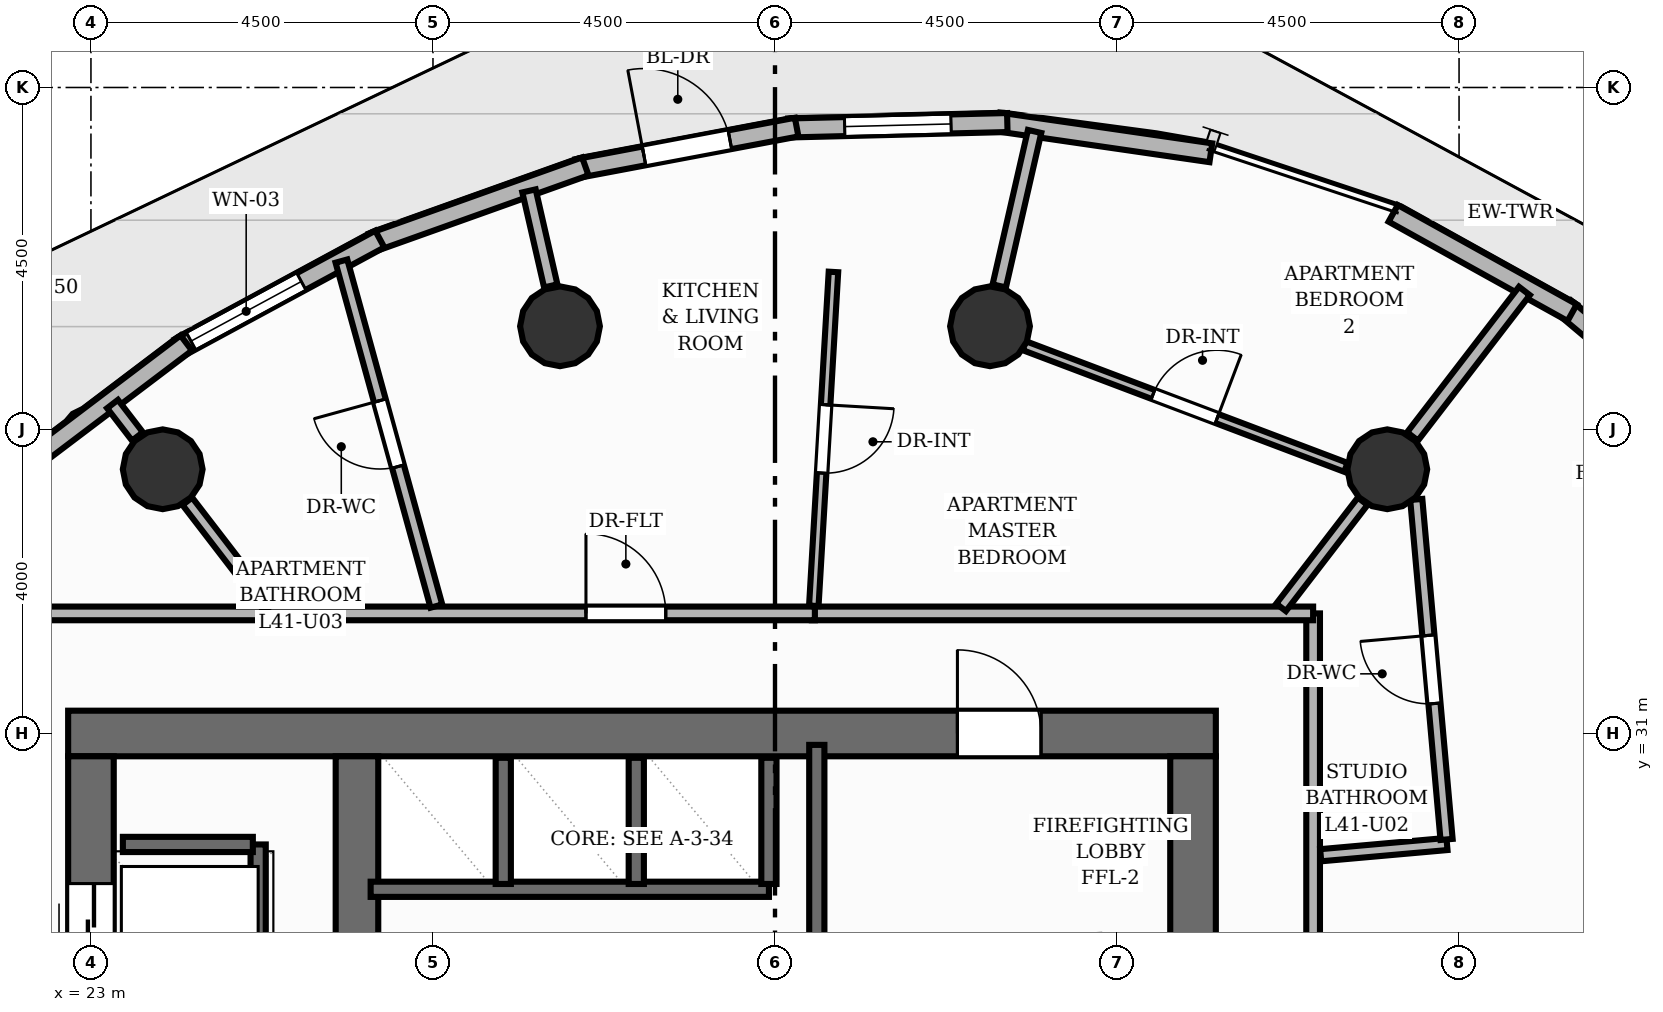
"""IFC4 building model, lengths in metres.
Left out: names, types, materials, properties, quantities, classifications, styles, units other than length and angle.
Written with IfcOpenShell. Run it as: python <this file> out.ifc"""

import sys

from ifc_helpers import new_model, si_unit, direction, frame, frame_2d, origin, origin_2d, place, context, subcontext, project, spatial, rectangle, circle, extrude, element, fill, save


model = new_model("IFC4")
c1 = context("Model", 3, precision=1e-05, world=origin(), true_north=direction((0.0, 1.0)))
c2 = subcontext(c1, "Body", "Model", "MODEL_VIEW")
j1 = project(units=[si_unit("LENGTHUNIT", "METRE"), si_unit("PLANEANGLEUNIT", "RADIAN")], contexts=[c1])
p1 = place(None, origin())
s1 = spatial("IfcSite", under=j1, at=p1, CompositionType="ELEMENT")
p2 = place(p1, origin())
s2 = spatial("IfcBuilding", under=s1, at=p2, CompositionType="ELEMENT")
p3 = place(p2, frame((0.0, 0.0, 139.36)))
s3 = spatial("IfcBuildingStorey", under=s2, at=p3, CompositionType="ELEMENT", Elevation=139.36)
p4 = place(p3, frame((22.7, 31.0, 0.0), z_axis=(0.0, 0.0, 1.0), x_axis=(1.0, 0.0, 0.0)))
e1 = element("IfcWall", 1, at=p4, inside=s3, PredefinedType="SHEAR", context=c2, shape_type="SweptSolid", body=[
    extrude(rectangle(XDim=15.1, YDim=0.6, at=frame_2d((7.55, 0.0))), origin(), (0.0, 0.0, 1.0), 3.2),
])
p5 = place(p4, frame((11.7, 0.0, 0.0)))
e2 = element("IfcOpeningElement", 2, at=p5, cuts=e1, PredefinedType="OPENING", context=c2, shape_type="SweptSolid", body=[
    extrude(rectangle(XDim=1.1, YDim=2.15, at=frame_2d((0.55, 1.075))), frame((0.0, 0.31, 0.0), z_axis=(0.0, -1.0, 0.0), x_axis=(1.0, 0.0, 0.0)), (0.0, 0.0, 1.0), 0.62),
])
p6 = place(p3, frame((23.0, 17.3, 0.0), z_axis=(0.0, 0.0, 1.0), x_axis=(0.0, 1.0, 0.0)))
e3 = element("IfcWall", 3, at=p6, inside=s3, PredefinedType="SHEAR", context=c2, shape_type="SweptSolid", body=[
    extrude(rectangle(XDim=13.4, YDim=0.6, at=frame_2d((6.7, 0.0))), origin(), (0.0, 0.0, 1.0), 3.2),
])
p7 = place(p6, frame((1.675, 0.0, 0.0)))
e4 = element("IfcOpeningElement", 4, at=p7, cuts=e3, PredefinedType="OPENING", context=c2, shape_type="SweptSolid", body=[
    extrude(rectangle(XDim=1.05, YDim=2.15, at=frame_2d((0.525, 1.075))), frame((0.0, 0.31, 0.0), z_axis=(0.0, -1.0, 0.0), x_axis=(1.0, 0.0, 0.0)), (0.0, 0.0, 1.0), 0.62),
])
p8 = place(p6, frame((6.175, 0.0, 0.0)))
e5 = element("IfcOpeningElement", 5, at=p8, cuts=e3, PredefinedType="OPENING", context=c2, shape_type="SweptSolid", body=[
    extrude(rectangle(XDim=1.05, YDim=2.15, at=frame_2d((0.525, 1.075))), frame((0.0, 0.31, 0.0), z_axis=(0.0, -1.0, 0.0), x_axis=(1.0, 0.0, 0.0)), (0.0, 0.0, 1.0), 0.62),
])
p9 = place(p6, frame((10.675, 0.0, 0.0)))
e6 = element("IfcOpeningElement", 6, at=p9, cuts=e3, PredefinedType="OPENING", context=c2, shape_type="SweptSolid", body=[
    extrude(rectangle(XDim=1.05, YDim=2.15, at=frame_2d((0.525, 1.075))), frame((0.0, 0.31, 0.0), z_axis=(0.0, -1.0, 0.0), x_axis=(1.0, 0.0, 0.0)), (0.0, 0.0, 1.0), 0.62),
])
p10 = place(p3, frame((37.5, 17.3, 0.0), z_axis=(0.0, 0.0, 1.0), x_axis=(0.0, 1.0, 0.0)))
e7 = element("IfcWall", 7, at=p10, inside=s3, PredefinedType="SHEAR", context=c2, shape_type="SweptSolid", body=[
    extrude(rectangle(XDim=13.4, YDim=0.6, at=frame_2d((6.7, 0.0))), origin(), (0.0, 0.0, 1.0), 3.2),
])
p11 = place(p3, frame((26.5, 17.3, 0.0), z_axis=(0.0, 0.0, 1.0), x_axis=(0.0, 1.0, 0.0)))
e8 = element("IfcWall", 8, at=p11, inside=s3, PredefinedType="SHEAR", context=c2, shape_type="SweptSolid", body=[
    extrude(rectangle(XDim=13.4, YDim=0.56, at=frame_2d((6.7, 0.0))), origin(), (0.0, 0.0, 1.0), 3.2),
])
for number, where, z_axis, x_axis in (
    (9, (40.056, 34.477, 0.0), (0.0, 0.0, 1.0), (1.0, 0.0, 0.0)),
    (10, (34.829, 36.358, 0.0), (0.0, 0.0, 1.0), (1.0, 0.0, 0.0)),
    (11, (29.171, 36.358, 0.0), (0.0, 0.0, 1.0), (1.0, 0.0, 0.0)),
    (12, (23.944, 34.477, 0.0), (0.0, 0.0, 1.0), (1.0, 0.0, 0.0)),
):
    element("IfcColumn", number, at=place(p3, frame(where, z_axis=z_axis, x_axis=x_axis)), inside=s3, PredefinedType="COLUMN", context=c2, shape_type="SweptSolid", body=[
        extrude(circle(Radius=0.525, at=origin_2d()), origin(), (0.0, 0.0, 1.0), 3.2),
    ])
p12 = place(p3, frame((42.395, 36.601, 0.0), z_axis=(0.0, 0.0, 1.0), x_axis=(0.764825125467, -0.644237943197, 0.0)))
e13 = element("IfcWall", 13, at=p12, inside=s3, PredefinedType="SOLIDWALL", context=c2, shape_type="SweptSolid", body=[
    extrude(rectangle(XDim=2.648, YDim=0.25, at=frame_2d((1.324, 0.0))), origin(), (0.0, 0.0, 1.0), 2.96),
])
p13 = place(p12, frame((0.624, 0.0, 0.85)))
e14 = element("IfcOpeningElement", 14, at=p13, cuts=e13, PredefinedType="OPENING", context=c2, shape_type="SweptSolid", body=[
    extrude(rectangle(XDim=1.4, YDim=1.55, at=frame_2d((0.7, 0.775))), frame((0.0, 0.135, 0.0), z_axis=(0.0, -1.0, 0.0), x_axis=(1.0, 0.0, 0.0)), (0.0, 0.0, 1.0), 0.27),
])
p14 = place(p3, frame((40.134, 37.844, 0.0), z_axis=(0.0, 0.0, 1.0), x_axis=(0.874341102682, -0.485311895755, 0.0)))
e15 = element("IfcWall", 15, at=p14, inside=s3, PredefinedType="SOLIDWALL", context=c2, shape_type="SweptSolid", body=[
    extrude(rectangle(XDim=2.693, YDim=0.25, at=frame_2d((1.346, 0.0))), origin(), (0.0, 0.0, 1.0), 2.96),
])
p15 = place(p3, frame((34.946, 39.045, 0.0), z_axis=(0.0, 0.0, 1.0), x_axis=(0.98966505468, -0.143398324768, 0.0)))
e16 = element("IfcWall", 16, at=p15, inside=s3, PredefinedType="SOLIDWALL", context=c2, shape_type="SweptSolid", body=[
    extrude(rectangle(XDim=2.818, YDim=0.25, at=frame_2d((1.409, 0.0))), origin(), (0.0, 0.0, 1.0), 2.96),
])
p16 = place(p3, frame((32.176, 38.967, 0.0), z_axis=(0.0, 0.0, 1.0), x_axis=(0.999687646408, 0.02499219116, 0.0)))
e17 = element("IfcWall", 17, at=p16, inside=s3, PredefinedType="SOLIDWALL", context=c2, shape_type="SweptSolid", body=[
    extrude(rectangle(XDim=2.882, YDim=0.25, at=frame_2d((1.441, 0.0))), origin(), (0.0, 0.0, 1.0), 2.96),
])
p17 = place(p16, frame((0.741, 0.0, 0.85)))
e18 = element("IfcOpeningElement", 18, at=p17, cuts=e17, PredefinedType="OPENING", context=c2, shape_type="SweptSolid", body=[
    extrude(rectangle(XDim=1.4, YDim=1.55, at=frame_2d((0.7, 0.775))), frame((0.0, 0.135, 0.0), z_axis=(0.0, -1.0, 0.0), x_axis=(1.0, 0.0, 0.0)), (0.0, 0.0, 1.0), 0.27),
])
p18 = place(p3, frame((29.399, 38.434, 0.0), z_axis=(0.0, 0.0, 1.0), x_axis=(0.982637070109, 0.185538105108, 0.0)))
e19 = element("IfcWall", 19, at=p18, inside=s3, PredefinedType="SOLIDWALL", context=c2, shape_type="SweptSolid", body=[
    extrude(rectangle(XDim=2.937, YDim=0.25, at=frame_2d((1.469, 0.0))), origin(), (0.0, 0.0, 1.0), 2.96),
])
p19 = place(p18, frame((0.893, 0.0, 0.0)))
e20 = element("IfcOpeningElement", 20, at=p19, cuts=e19, PredefinedType="OPENING", context=c2, shape_type="SweptSolid", body=[
    extrude(rectangle(XDim=1.15, YDim=2.2, at=frame_2d((0.575, 1.1))), frame((0.0, 0.135, 0.0), z_axis=(0.0, -1.0, 0.0), x_axis=(1.0, 0.0, 0.0)), (0.0, 0.0, 1.0), 0.27),
])
p20 = place(p3, frame((26.701, 37.461, 0.0), z_axis=(0.0, 0.0, 1.0), x_axis=(0.94175304307, 0.33630522724, 0.0)))
e21 = element("IfcWall", 21, at=p20, inside=s3, PredefinedType="SOLIDWALL", context=c2, shape_type="SweptSolid", body=[
    extrude(rectangle(XDim=2.977, YDim=0.25, at=frame_2d((1.489, 0.0))), origin(), (0.0, 0.0, 1.0), 2.96),
])
p21 = place(p3, frame((24.163, 36.079, 0.0), z_axis=(0.0, 0.0, 1.0), x_axis=(0.879567466611, 0.475774181393, 0.0)))
e22 = element("IfcWall", 22, at=p21, inside=s3, PredefinedType="SOLIDWALL", context=c2, shape_type="SweptSolid", body=[
    extrude(rectangle(XDim=2.998, YDim=0.25, at=frame_2d((1.499, 0.0))), origin(), (0.0, 0.0, 1.0), 2.96),
])
p22 = place(p21, frame((0.175, 0.0, 0.85)))
e23 = element("IfcOpeningElement", 23, at=p22, cuts=e22, PredefinedType="OPENING", context=c2, shape_type="SweptSolid", body=[
    extrude(rectangle(XDim=1.65, YDim=1.55, at=frame_2d((0.825, 0.775))), frame((0.0, 0.135, 0.0), z_axis=(0.0, -1.0, 0.0), x_axis=(1.0, 0.0, 0.0)), (0.0, 0.0, 1.0), 0.27),
])
p23 = place(p3, frame((21.863, 34.329, 0.0), z_axis=(0.0, 0.0, 1.0), x_axis=(0.797511213298, 0.603304122863, 0.0)))
e24 = element("IfcWall", 24, at=p23, inside=s3, PredefinedType="SOLIDWALL", context=c2, shape_type="SweptSolid", body=[
    extrude(rectangle(XDim=2.998, YDim=0.25, at=frame_2d((1.499, 0.0))), origin(), (0.0, 0.0, 1.0), 2.96),
])
p24 = place(p3, frame((32.55, 27.35, 0.0), z_axis=(0.0, 0.0, 1.0), x_axis=(0.0, 1.0, 0.0)))
e25 = element("IfcWall", 25, at=p24, inside=s3, PredefinedType="SHEAR", context=c2, shape_type="SweptSolid", body=[
    extrude(rectangle(XDim=3.5, YDim=0.2, at=frame_2d((1.75, 0.0))), origin(), (0.0, 0.0, 1.0), 3.2),
])
p25 = place(p3, frame((25.2, 18.46, 0.0), z_axis=(0.0, 0.0, 1.0), x_axis=(0.0, 1.0, 0.0)))
e26 = element("IfcWall", 26, at=p25, inside=s3, PredefinedType="SHEAR", context=c2, shape_type="SweptSolid", body=[
    extrude(rectangle(XDim=11.08, YDim=0.2, at=frame_2d((5.54, 0.0))), origin(), (0.0, 0.0, 1.0), 3.2),
])
p26 = place(p3, frame((23.42, 29.54, 0.0), z_axis=(0.0, 0.0, 1.0), x_axis=(1.0, 0.0, 0.0)))
e27 = element("IfcWall", 27, at=p26, inside=s3, PredefinedType="SHEAR", context=c2, shape_type="SweptSolid", body=[
    extrude(rectangle(XDim=1.71, YDim=0.2, at=frame_2d((0.855, 0.0))), origin(), (0.0, 0.0, 1.0), 3.2),
])
p27 = place(p3, frame((26.68, 28.95, 0.0), z_axis=(0.0, 0.0, 1.0), x_axis=(1.0, 0.0, 0.0)))
e28 = element("IfcWall", 28, at=p27, inside=s3, PredefinedType="SHEAR", context=c2, shape_type="SweptSolid", body=[
    extrude(rectangle(XDim=5.24, YDim=0.2, at=frame_2d((2.62, 0.0))), origin(), (0.0, 0.0, 1.0), 3.2),
])
for number, where, z_axis, x_axis in (
    (29, (31.92, 29.02, 0.0), (0.0, 0.0, 1.0), (0.0, 1.0, 0.0)),
    (30, (28.425, 29.02, 0.0), (0.0, 0.0, 1.0), (0.0, 1.0, 0.0)),
    (31, (30.175, 29.02, 0.0), (0.0, 0.0, 1.0), (0.0, 1.0, 0.0)),
):
    element("IfcWall", number, at=place(p3, frame(where, z_axis=z_axis, x_axis=x_axis)), inside=s3, PredefinedType="SHEAR", context=c2, shape_type="SweptSolid", body=[
        extrude(rectangle(XDim=1.66, YDim=0.2, at=frame_2d((0.83, 0.0))), origin(), (0.0, 0.0, 1.0), 3.2),
    ])
p28 = place(p3, frame((40.388, 34.908, 0.0), z_axis=(0.0, 0.0, 1.0), x_axis=(0.609549509747, 0.79274800231, 0.0)))
e32 = element("IfcWall", 32, at=p28, inside=s3, PredefinedType="PARTITIONING", context=c2, shape_type="SweptSolid", body=[
    extrude(rectangle(XDim=2.415, YDim=0.18, at=frame_2d((1.208, 0.0))), origin(), (0.0, 0.0, 1.0), 2.336),
])
p29 = place(p3, frame((34.95, 36.889, 0.0), z_axis=(0.0, 0.0, 1.0), x_axis=(0.223063251486, 0.974803973031, 0.0)))
e33 = element("IfcWall", 33, at=p29, inside=s3, PredefinedType="PARTITIONING", context=c2, shape_type="SweptSolid", body=[
    extrude(rectangle(XDim=2.085, YDim=0.18, at=frame_2d((1.042, 0.0))), origin(), (0.0, 0.0, 1.0), 2.336),
])
p30 = place(p3, frame((29.05, 36.889, 0.0), z_axis=(0.0, 0.0, 1.0), x_axis=(-0.223093561241, 0.974797036789, 0.0)))
e34 = element("IfcWall", 34, at=p30, inside=s3, PredefinedType="PARTITIONING", context=c2, shape_type="SweptSolid", body=[
    extrude(rectangle(XDim=1.282, YDim=0.18, at=frame_2d((0.641, 0.0))), origin(), (0.0, 0.0, 1.0), 2.336),
])
p31 = place(p3, frame((23.612, 34.908, 0.0), z_axis=(0.0, 0.0, 1.0), x_axis=(-0.609469486836, 0.792809526063, 0.0)))
e35 = element("IfcWall", 35, at=p31, inside=s3, PredefinedType="PARTITIONING", context=c2, shape_type="SweptSolid", body=[
    extrude(rectangle(XDim=0.538, YDim=0.18, at=frame_2d((0.269, 0.0))), origin(), (0.0, 0.0, 1.0), 2.336),
])
p32 = place(p3, frame((39.08, 32.58, 0.0), z_axis=(0.0, 0.0, 1.0), x_axis=(0.0, -1.0, 0.0)))
e36 = element("IfcWall", 36, at=p32, inside=s3, PredefinedType="PARTITIONING", context=c2, shape_type="SweptSolid", body=[
    extrude(rectangle(XDim=17.16, YDim=0.18, at=frame_2d((8.58, 0.0))), origin(), (0.0, 0.0, 1.0), 2.955),
])
p33 = place(p32, frame((9.64, 0.0, 0.0)))
e37 = element("IfcOpeningElement", 37, at=p33, cuts=e36, PredefinedType="OPENING", context=c2, shape_type="SweptSolid", body=[
    extrude(rectangle(XDim=1.05, YDim=2.15, at=frame_2d((0.525, 1.075))), frame((0.0, 0.1, 0.0), z_axis=(0.0, -1.0, 0.0), x_axis=(1.0, 0.0, 0.0)), (0.0, 0.0, 1.0), 0.2),
])
p34 = place(p3, frame((32.485, 32.58, 0.0), z_axis=(0.0, 0.0, 1.0), x_axis=(1.0, 0.0, 0.0)))
e38 = element("IfcWall", 38, at=p34, inside=s3, PredefinedType="PARTITIONING", context=c2, shape_type="SweptSolid", body=[
    extrude(rectangle(XDim=6.595, YDim=0.18, at=frame_2d((3.298, 0.0))), origin(), (0.0, 0.0, 1.0), 2.955),
])
p35 = place(p3, frame((21.42, 32.58, 0.0), z_axis=(0.0, 0.0, 1.0), x_axis=(1.0, 0.0, 0.0)))
e39 = element("IfcWall", 39, at=p35, inside=s3, PredefinedType="PARTITIONING", context=c2, shape_type="SweptSolid", body=[
    extrude(rectangle(XDim=11.105, YDim=0.18, at=frame_2d((5.552, 0.0))), origin(), (0.0, 0.0, 1.0), 2.955),
])
p36 = place(p35, frame((8.093, 0.0, 0.0)))
e40 = element("IfcOpeningElement", 40, at=p36, cuts=e39, PredefinedType="OPENING", context=c2, shape_type="SweptSolid", body=[
    extrude(rectangle(XDim=1.05, YDim=2.15, at=frame_2d((0.525, 1.075))), frame((0.0, 0.1, 0.0), z_axis=(0.0, -1.0, 0.0), x_axis=(1.0, 0.0, 0.0)), (0.0, 0.0, 1.0), 0.2),
])
p37 = place(p3, frame((39.18, 29.398, 0.0), z_axis=(0.0, 0.0, 1.0), x_axis=(0.996058284503, 0.088701149215, 0.0)))
e41 = element("IfcWall", 41, at=p37, inside=s3, PredefinedType="PLUMBINGWALL", context=c2, shape_type="SweptSolid", body=[
    extrude(rectangle(XDim=1.668, YDim=0.16, at=frame_2d((0.834, 0.0))), origin(), (0.0, 0.0, 1.0), 2.955),
])
p38 = place(p3, frame((40.836, 29.606, 0.0), z_axis=(0.0, 0.0, 1.0), x_axis=(-0.08877110741, 0.996052052098, 0.0)))
e42 = element("IfcWall", 42, at=p38, inside=s3, PredefinedType="PLUMBINGWALL", context=c2, shape_type="SweptSolid", body=[
    extrude(rectangle(XDim=4.491, YDim=0.16, at=frame_2d((2.246, 0.0))), origin(), (0.0, 0.0, 1.0), 2.955),
])
p39 = place(p38, frame((1.796, 0.0, 0.0)))
e43 = element("IfcOpeningElement", 43, at=p39, cuts=e42, PredefinedType="OPENING", context=c2, shape_type="SweptSolid", body=[
    extrude(rectangle(XDim=0.9, YDim=2.1, at=frame_2d((0.45, 1.05))), frame((0.0, 0.09, 0.0), z_axis=(0.0, -1.0, 0.0), x_axis=(1.0, 0.0, 0.0)), (0.0, 0.0, 1.0), 0.18),
])
p40 = place(p3, frame((38.658, 32.659, 0.0), z_axis=(0.0, 0.0, 1.0), x_axis=(0.609536601946, 0.792757927042, 0.0)))
e44 = element("IfcWall", 44, at=p40, inside=s3, PredefinedType="PLUMBINGWALL", context=c2, shape_type="SweptSolid", body=[
    extrude(rectangle(XDim=1.761, YDim=0.16, at=frame_2d((0.881, 0.0))), origin(), (0.0, 0.0, 1.0), 2.336),
])
p41 = place(p3, frame((27.545, 32.677, 0.0), z_axis=(0.0, 0.0, 1.0), x_axis=(-0.265393905211, 0.964140070258, 0.0)))
e45 = element("IfcWall", 45, at=p41, inside=s3, PredefinedType="PLUMBINGWALL", context=c2, shape_type="SweptSolid", body=[
    extrude(rectangle(XDim=4.708, YDim=0.16, at=frame_2d((2.354, 0.0))), origin(), (0.0, 0.0, 1.0), 2.955),
])
p42 = place(p41, frame((1.904, 0.0, 0.0)))
e46 = element("IfcOpeningElement", 46, at=p42, cuts=e45, PredefinedType="OPENING", context=c2, shape_type="SweptSolid", body=[
    extrude(rectangle(XDim=0.9, YDim=2.1, at=frame_2d((0.45, 1.05))), frame((0.0, 0.09, 0.0), z_axis=(0.0, -1.0, 0.0), x_axis=(1.0, 0.0, 0.0)), (0.0, 0.0, 1.0), 0.18),
])
p43 = place(p3, frame((32.769, 37.073, 0.0), z_axis=(0.0, 0.0, 1.0), x_axis=(-0.058751291398, -0.998272651012, 0.0)))
e47 = element("IfcWall", 47, at=p43, inside=s3, PredefinedType="PARTITIONING", context=c2, shape_type="SweptSolid", body=[
    extrude(rectangle(XDim=4.401, YDim=0.125, at=frame_2d((2.2, 0.0))), origin(), (0.0, 0.0, 1.0), 2.692),
])
p44 = place(p43, frame((1.75, 0.0, 0.0)))
e48 = element("IfcOpeningElement", 48, at=p44, cuts=e47, PredefinedType="OPENING", context=c2, shape_type="SweptSolid", body=[
    extrude(rectangle(XDim=0.9, YDim=2.1, at=frame_2d((0.45, 1.05))), frame((0.0, 0.073, 0.0), z_axis=(0.0, -1.0, 0.0), x_axis=(1.0, 0.0, 0.0)), (0.0, 0.0, 1.0), 0.145),
])
p45 = place(p3, frame((25.342, 32.659, 0.0), z_axis=(0.0, 0.0, 1.0), x_axis=(-0.609536601946, 0.792757927042, 0.0)))
e49 = element("IfcWall", 49, at=p45, inside=s3, PredefinedType="PLUMBINGWALL", context=c2, shape_type="SweptSolid", body=[
    extrude(rectangle(XDim=1.761, YDim=0.16, at=frame_2d((0.881, 0.0))), origin(), (0.0, 0.0, 1.0), 2.336),
])
p46 = place(p3, frame((35.278, 36.103, 0.0), z_axis=(0.0, 0.0, 1.0), x_axis=(0.935309901838, -0.353829602385, 0.0)))
e50 = element("IfcWall", 50, at=p46, inside=s3, PredefinedType="PARTITIONING", context=c2, shape_type="SweptSolid", body=[
    extrude(rectangle(XDim=4.526, YDim=0.125, at=frame_2d((2.263, 0.0))), origin(), (0.0, 0.0, 1.0), 2.411),
])
p47 = place(p46, frame((1.813, 0.0, 0.0)))
e51 = element("IfcOpeningElement", 51, at=p47, cuts=e50, PredefinedType="OPENING", context=c2, shape_type="SweptSolid", body=[
    extrude(rectangle(XDim=0.9, YDim=2.1, at=frame_2d((0.45, 1.05))), frame((0.0, 0.073, 0.0), z_axis=(0.0, -1.0, 0.0), x_axis=(1.0, 0.0, 0.0)), (0.0, 0.0, 1.0), 0.145),
])
p48 = place(p19, origin())
e52 = element("IfcDoor", 52, at=p48, inside=s3, OperationType="SINGLE_SWING_LEFT", PredefinedType="DOOR", context=c2, shape_type="SweptSolid", body=[
    extrude(rectangle(XDim=1.15, YDim=2.2, at=frame_2d((0.575, 1.1))), frame((0.0, 0.025, 0.0), z_axis=(0.0, -1.0, 0.0), x_axis=(1.0, 0.0, 0.0)), (0.0, 0.0, 1.0), 0.05),
])
fill(e20, e52)
p49 = place(p17, origin())
e53 = element("IfcWindow", 53, at=p49, inside=s3, PartitioningType="SINGLE_PANEL", PredefinedType="WINDOW", context=c2, shape_type="SweptSolid", body=[
    extrude(rectangle(XDim=1.4, YDim=1.55, at=frame_2d((0.7, 0.775))), frame((0.0, 0.03, 0.0), z_axis=(0.0, -1.0, 0.0), x_axis=(1.0, 0.0, 0.0)), (0.0, 0.0, 1.0), 0.06),
])
fill(e18, e53)
p50 = place(p22, origin())
e54 = element("IfcWindow", 54, at=p50, inside=s3, PartitioningType="SINGLE_PANEL", PredefinedType="WINDOW", context=c2, shape_type="SweptSolid", body=[
    extrude(rectangle(XDim=1.65, YDim=1.55, at=frame_2d((0.825, 0.775))), frame((0.0, 0.03, 0.0), z_axis=(0.0, -1.0, 0.0), x_axis=(1.0, 0.0, 0.0)), (0.0, 0.0, 1.0), 0.06),
])
fill(e23, e54)
p51 = place(p5, origin())
e55 = element("IfcDoor", 55, at=p51, inside=s3, OperationType="SINGLE_SWING_LEFT", PredefinedType="DOOR", context=c2, shape_type="SweptSolid", body=[
    extrude(rectangle(XDim=1.1, YDim=2.15, at=frame_2d((0.55, 1.075))), frame((0.0, 0.025, 0.0), z_axis=(0.0, -1.0, 0.0), x_axis=(1.0, 0.0, 0.0)), (0.0, 0.0, 1.0), 0.05),
])
fill(e2, e55)
p52 = place(p9, origin())
e56 = element("IfcDoor", 56, at=p52, inside=s3, OperationType="DOUBLE_DOOR_SLIDING", PredefinedType="DOOR", context=c2, shape_type="SweptSolid", body=[
    extrude(rectangle(XDim=1.05, YDim=2.15, at=frame_2d((0.525, 1.075))), frame((0.0, 0.025, 0.0), z_axis=(0.0, -1.0, 0.0), x_axis=(1.0, 0.0, 0.0)), (0.0, 0.0, 1.0), 0.05),
])
fill(e6, e56)
p53 = place(p39, origin())
e57 = element("IfcDoor", 57, at=p53, inside=s3, OperationType="SINGLE_SWING_RIGHT", PredefinedType="DOOR", context=c2, shape_type="SweptSolid", body=[
    extrude(rectangle(XDim=0.9, YDim=2.1, at=frame_2d((0.45, 1.05))), frame((0.0, 0.025, 0.0), z_axis=(0.0, -1.0, 0.0), x_axis=(1.0, 0.0, 0.0)), (0.0, 0.0, 1.0), 0.05),
])
fill(e43, e57)
p54 = place(p36, origin())
e58 = element("IfcDoor", 58, at=p54, inside=s3, OperationType="SINGLE_SWING_LEFT", PredefinedType="DOOR", context=c2, shape_type="SweptSolid", body=[
    extrude(rectangle(XDim=1.05, YDim=2.15, at=frame_2d((0.525, 1.075))), frame((0.0, 0.025, 0.0), z_axis=(0.0, -1.0, 0.0), x_axis=(1.0, 0.0, 0.0)), (0.0, 0.0, 1.0), 0.05),
])
fill(e40, e58)
p55 = place(p42, origin())
e59 = element("IfcDoor", 59, at=p55, inside=s3, OperationType="SINGLE_SWING_RIGHT", PredefinedType="DOOR", context=c2, shape_type="SweptSolid", body=[
    extrude(rectangle(XDim=0.9, YDim=2.1, at=frame_2d((0.45, 1.05))), frame((0.0, 0.025, 0.0), z_axis=(0.0, -1.0, 0.0), x_axis=(1.0, 0.0, 0.0)), (0.0, 0.0, 1.0), 0.05),
])
fill(e46, e59)
p56 = place(p44, origin())
e60 = element("IfcDoor", 60, at=p56, inside=s3, OperationType="SINGLE_SWING_LEFT", PredefinedType="DOOR", context=c2, shape_type="SweptSolid", body=[
    extrude(rectangle(XDim=0.9, YDim=2.1, at=frame_2d((0.45, 1.05))), frame((0.0, 0.025, 0.0), z_axis=(0.0, -1.0, 0.0), x_axis=(1.0, 0.0, 0.0)), (0.0, 0.0, 1.0), 0.05),
])
fill(e48, e60)
p57 = place(p47, origin())
e61 = element("IfcDoor", 61, at=p57, inside=s3, OperationType="SINGLE_SWING_RIGHT", PredefinedType="DOOR", context=c2, shape_type="SweptSolid", body=[
    extrude(rectangle(XDim=0.9, YDim=2.1, at=frame_2d((0.45, 1.05))), frame((0.0, 0.025, 0.0), z_axis=(0.0, -1.0, 0.0), x_axis=(1.0, 0.0, 0.0)), (0.0, 0.0, 1.0), 0.05),
])
fill(e51, e61)
save(model, sys.argv[1])
